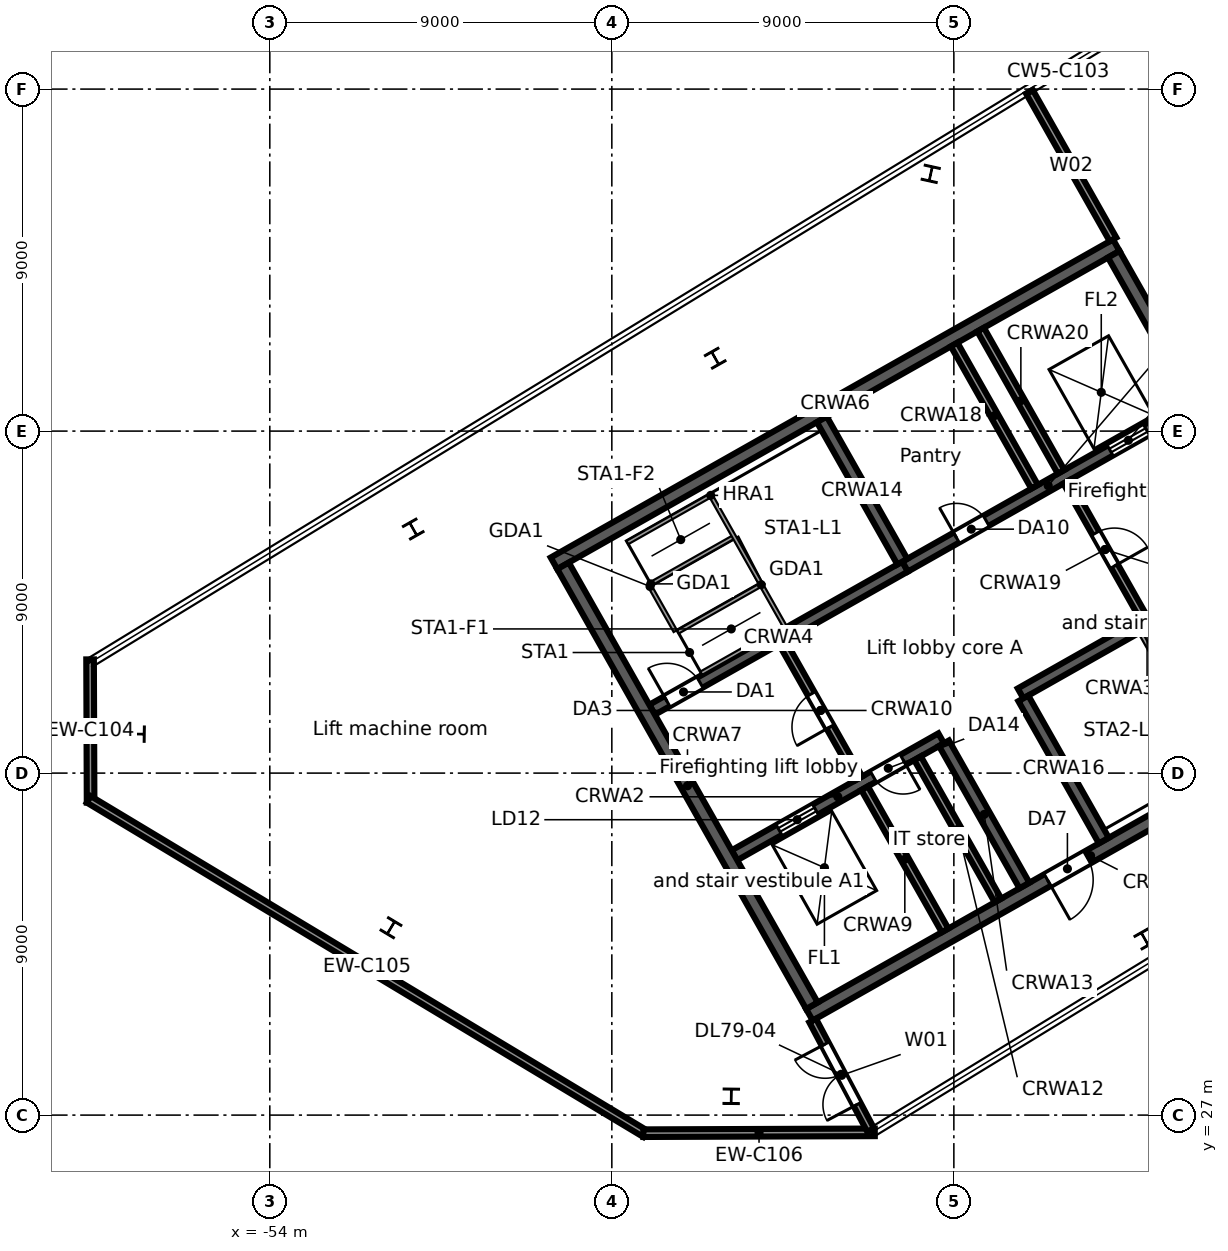
"""IFC4 building model, lengths in metres.
Left out: names, types, materials, properties, quantities, classifications, styles, units other than length and angle.
Written with IfcOpenShell. Run it as: python <this file> out.ifc"""

import sys

from ifc_helpers import new_model, si_unit, direction, frame, frame_2d, origin, origin_2d, place, context, subcontext, project, spatial, rectangle, i_section, extrude, element, fill, save


model = new_model("IFC4")
c1 = context("Model", 3, precision=1e-05, world=origin(), true_north=direction((0.0, 1.0)))
c2 = subcontext(c1, "Body", "Model", "MODEL_VIEW")
j1 = project(units=[si_unit("LENGTHUNIT", "METRE"), si_unit("PLANEANGLEUNIT", "RADIAN")], contexts=[c1])
p1 = place(None, origin())
s1 = spatial("IfcSite", under=j1, at=p1, CompositionType="ELEMENT")
p2 = place(p1, origin())
s2 = spatial("IfcBuilding", under=s1, at=p2, CompositionType="ELEMENT")
p3 = place(p2, frame((0.0, 0.0, 350.5)))
s3 = spatial("IfcBuildingStorey", under=s2, at=p3, CompositionType="ELEMENT", Elevation=350.5)
p4 = place(p3, frame((-42.28, 46.919, 0.0), z_axis=(0.0, 0.0, 1.0), x_axis=(-0.87035569594, -0.492423560103, 0.0)))
e1 = element("IfcColumn", 1, at=p4, inside=s3, PredefinedType="COLUMN", context=c2, shape_type="SweptSolid", body=[
    extrude(i_section(OverallWidth=0.4, OverallDepth=0.4, WebThickness=0.013, FlangeThickness=0.021, FilletRadius=0.022, at=origin_2d()), origin(), (0.0, 0.0, 1.0), 3.3),
])
for number, where, z_axis, x_axis in (
    (2, (-50.226, 42.423, 0.0), (0.0, 0.0, 1.0), (-0.87, -0.492, 0.0)),
    (3, (-57.493, 37.027, 0.0), (0.0, 0.0, 1.0), (-0.013, -1.0, 0.0)),
    (4, (-50.812, 31.931, 0.0), (0.0, 0.0, 1.0), (0.857, -0.515, 0.0)),
    (5, (-41.858, 27.495, 0.0), (0.0, 0.0, 1.0), (1.0, -0.013, 0.0)),
):
    element("IfcColumn", number, at=place(p3, frame(where, z_axis=z_axis, x_axis=x_axis)), inside=s3, PredefinedType="COLUMN", context=c2, shape_type="SweptSolid", body=[
        extrude(i_section(OverallWidth=0.4, OverallDepth=0.4, WebThickness=0.013, FlangeThickness=0.021, FilletRadius=0.022, at=origin_2d()), origin(), (0.0, 0.0, 1.0), 3.6),
    ])
for number, where, z_axis, x_axis in (
    (6, (-30.976, 31.635, 0.0), (0.0, 0.0, 1.0), (0.87, 0.492, 0.0)),
    (7, (-36.609, 51.77, 0.0), (0.0, 0.0, 1.0), (-0.977, 0.215, 0.0)),
):
    element("IfcColumn", number, at=place(p3, frame(where, z_axis=z_axis, x_axis=x_axis)), inside=s3, PredefinedType="COLUMN", context=c2, shape_type="SweptSolid", body=[
        extrude(i_section(OverallWidth=0.4, OverallDepth=0.4, WebThickness=0.013, FlangeThickness=0.021, FilletRadius=0.022, at=origin_2d()), origin(), (0.0, 0.0, 1.0), 3.3),
    ])
p5 = place(p3, frame((-58.716, 35.224, 0.0), z_axis=(0.0, 0.0, 1.0), x_axis=(-0.003563076631, 0.999993652222, 0.0)))
e8 = element("IfcWall", 8, at=p5, inside=s3, PredefinedType="STANDARD", context=c2, shape_type="SweptSolid", body=[
    extrude(rectangle(XDim=3.769, YDim=0.2, at=frame_2d((1.884, 0.0))), origin(), (0.0, 0.0, 1.0), 3.3),
])
p6 = place(p3, frame((-44.12, 26.51, 0.0), z_axis=(0.0, 0.0, 1.0), x_axis=(-0.85716996621, 0.515033638734, 0.0)))
e9 = element("IfcWall", 9, at=p6, inside=s3, PredefinedType="STANDARD", context=c2, shape_type="SweptSolid", body=[
    extrude(rectangle(XDim=17.084, YDim=0.2, at=frame_2d((8.542, 0.0))), origin(), (0.0, 0.0, 1.0), 3.3),
])
p7 = place(p3, frame((-38.081, 26.546, 0.0), z_axis=(0.0, 0.0, 1.0), x_axis=(-0.999993637837, -0.003567111574, 0.0)))
e10 = element("IfcWall", 10, at=p7, inside=s3, PredefinedType="STANDARD", context=c2, shape_type="SweptSolid", body=[
    extrude(rectangle(XDim=6.091, YDim=0.2, at=frame_2d((3.046, 0.0))), origin(), (0.0, 0.0, 1.0), 3.3),
])
p8 = place(p3, frame((-39.801, 29.64, 0.0), z_axis=(0.0, 0.0, 1.0), x_axis=(0.870359753402, 0.492416388494, 0.0)))
e11 = element("IfcWall", 11, at=p8, inside=s3, PredefinedType="SOLIDWALL", context=c2, shape_type="SweptSolid", body=[
    extrude(rectangle(XDim=17.0, YDim=0.35, at=frame_2d((8.5, 0.0))), origin(), (0.0, 0.0, 1.0), 3.3),
])
p9 = place(p8, frame((7.2, 0.0, 0.0)))
e12 = element("IfcOpeningElement", 12, at=p9, cuts=e11, PredefinedType="OPENING", context=c2, shape_type="SweptSolid", body=[
    extrude(rectangle(XDim=1.2, YDim=2.1, at=frame_2d((0.6, 1.05))), frame((0.0, 0.185, 0.0), z_axis=(0.0, -1.0, 0.0), x_axis=(1.0, 0.0, 0.0)), (0.0, 0.0, 1.0), 0.37),
])
p10 = place(p3, frame((-41.774, 33.838, 0.0), z_axis=(0.0, 0.0, 1.0), x_axis=(0.870355415866, 0.492424055132, 0.0)))
e13 = element("IfcWall", 13, at=p10, inside=s3, PredefinedType="SOLIDWALL", context=c2, shape_type="SweptSolid", body=[
    extrude(rectangle(XDim=6.25, YDim=0.3, at=frame_2d((3.125, 0.0))), origin(), (0.0, 0.0, 1.0), 3.3),
])
p11 = place(p10, frame((1.35, 0.0, 0.0)))
e14 = element("IfcOpeningElement", 14, at=p11, cuts=e13, PredefinedType="OPENING", context=c2, shape_type="SweptSolid", body=[
    extrude(rectangle(XDim=1.1, YDim=2.1, at=frame_2d((0.55, 1.05))), frame((0.0, 0.16, 0.0), z_axis=(0.0, -1.0, 0.0), x_axis=(1.0, 0.0, 0.0)), (0.0, 0.0, 1.0), 0.32),
])
p12 = place(p10, frame((4.2, 0.0, 0.0)))
e15 = element("IfcOpeningElement", 15, at=p12, cuts=e13, PredefinedType="OPENING", context=c2, shape_type="SweptSolid", body=[
    extrude(rectangle(XDim=0.9, YDim=2.1, at=frame_2d((0.45, 1.05))), frame((0.0, 0.16, 0.0), z_axis=(0.0, -1.0, 0.0), x_axis=(1.0, 0.0, 0.0)), (0.0, 0.0, 1.0), 0.32),
])
p13 = place(p3, frame((-34.245, 38.097, 0.0), z_axis=(0.0, 0.0, 1.0), x_axis=(0.870352347706, 0.49242947804, 0.0)))
e16 = element("IfcWall", 16, at=p13, inside=s3, PredefinedType="SOLIDWALL", context=c2, shape_type="SweptSolid", body=[
    extrude(rectangle(XDim=7.65, YDim=0.3, at=frame_2d((3.825, 0.0))), origin(), (0.0, 0.0, 1.0), 3.3),
])
p14 = place(p13, frame((6.2, 0.0, 0.0)))
e17 = element("IfcOpeningElement", 17, at=p14, cuts=e16, PredefinedType="OPENING", context=c2, shape_type="SweptSolid", body=[
    extrude(rectangle(XDim=1.0, YDim=2.1, at=frame_2d((0.5, 1.05))), frame((0.0, 0.16, 0.0), z_axis=(0.0, -1.0, 0.0), x_axis=(1.0, 0.0, 0.0)), (0.0, 0.0, 1.0), 0.32),
])
p15 = place(p3, frame((-43.94, 37.667, 0.0), z_axis=(0.0, 0.0, 1.0), x_axis=(0.870352347706, 0.49242947804, 0.0)))
e18 = element("IfcWall", 18, at=p15, inside=s3, PredefinedType="SOLIDWALL", context=c2, shape_type="SweptSolid", body=[
    extrude(rectangle(XDim=7.65, YDim=0.3, at=frame_2d((3.825, 0.0))), origin(), (0.0, 0.0, 1.0), 3.3),
])
p16 = place(p15, frame((0.45, 0.0, 0.0)))
e19 = element("IfcOpeningElement", 19, at=p16, cuts=e18, PredefinedType="OPENING", context=c2, shape_type="SweptSolid", body=[
    extrude(rectangle(XDim=1.0, YDim=2.1, at=frame_2d((0.5, 1.05))), frame((0.0, 0.16, 0.0), z_axis=(0.0, -1.0, 0.0), x_axis=(1.0, 0.0, 0.0)), (0.0, 0.0, 1.0), 0.32),
])
p17 = place(p3, frame((-37.282, 41.435, 0.0), z_axis=(0.0, 0.0, 1.0), x_axis=(0.870364588774, 0.492407841741, 0.0)))
e20 = element("IfcWall", 20, at=p17, inside=s3, PredefinedType="SOLIDWALL", context=c2, shape_type="SweptSolid", body=[
    extrude(rectangle(XDim=8.65, YDim=0.3, at=frame_2d((4.325, 0.0))), origin(), (0.0, 0.0, 1.0), 3.3),
])
p18 = place(p17, frame((6.2, 0.0, 0.0)))
e21 = element("IfcOpeningElement", 21, at=p18, cuts=e20, PredefinedType="OPENING", context=c2, shape_type="SweptSolid", body=[
    extrude(rectangle(XDim=1.1, YDim=2.1, at=frame_2d((0.55, 1.05))), frame((0.0, 0.16, 0.0), z_axis=(0.0, -1.0, 0.0), x_axis=(1.0, 0.0, 0.0)), (0.0, 0.0, 1.0), 0.32),
])
p19 = place(p17, frame((1.55, 0.0, 0.0)))
e22 = element("IfcOpeningElement", 22, at=p19, cuts=e20, PredefinedType="OPENING", context=c2, shape_type="SweptSolid", body=[
    extrude(rectangle(XDim=0.9, YDim=2.1, at=frame_2d((0.45, 1.05))), frame((0.0, 0.16, 0.0), z_axis=(0.0, -1.0, 0.0), x_axis=(1.0, 0.0, 0.0)), (0.0, 0.0, 1.0), 0.32),
])
p20 = place(p3, frame((-46.522, 41.521, 0.0), z_axis=(0.0, 0.0, 1.0), x_axis=(0.870359753402, 0.492416388494, 0.0)))
e23 = element("IfcWall", 23, at=p20, inside=s3, PredefinedType="SOLIDWALL", context=c2, shape_type="SweptSolid", body=[
    extrude(rectangle(XDim=17.0, YDim=0.35, at=frame_2d((8.5, 0.0))), origin(), (0.0, 0.0, 1.0), 3.3),
])
p21 = place(p3, frame((-46.284, 41.454, 0.0), z_axis=(0.0, 0.0, 1.0), x_axis=(0.492429810477, -0.870352159619, 0.0)))
e24 = element("IfcWall", 24, at=p21, inside=s3, PredefinedType="SOLIDWALL", context=c2, shape_type="SweptSolid", body=[
    extrude(rectangle(XDim=13.3, YDim=0.35, at=frame_2d((6.65, 0.0))), origin(), (0.0, 0.0, 1.0), 3.3),
])
p22 = place(p3, frame((-38.349, 35.603, 0.0), z_axis=(0.0, 0.0, 1.0), x_axis=(0.492410799949, -0.870362915164, 0.0)))
e25 = element("IfcWall", 25, at=p22, inside=s3, PredefinedType="SOLIDWALL", context=c2, shape_type="SweptSolid", body=[
    extrude(rectangle(XDim=4.3, YDim=0.2, at=frame_2d((2.15, 0.0))), origin(), (0.0, 0.0, 1.0), 3.3),
])
p23 = place(p3, frame((-40.516, 39.433, 0.0), z_axis=(0.0, 0.0, 1.0), x_axis=(0.492453559952, -0.87033872216, 0.0)))
e26 = element("IfcWall", 26, at=p23, inside=s3, PredefinedType="PARTITIONING", context=c2, shape_type="SweptSolid", body=[
    extrude(rectangle(XDim=4.1, YDim=0.2, at=frame_2d((2.05, 0.0))), origin(), (0.0, 0.0, 1.0), 3.3),
])
p24 = place(p23, frame((1.55, 0.0, 0.0)))
e27 = element("IfcOpeningElement", 27, at=p24, cuts=e26, PredefinedType="OPENING", context=c2, shape_type="SweptSolid", body=[
    extrude(rectangle(XDim=1.0, YDim=2.1, at=frame_2d((0.5, 1.05))), frame((0.0, 0.11, 0.0), z_axis=(0.0, -1.0, 0.0), x_axis=(1.0, 0.0, 0.0)), (0.0, 0.0, 1.0), 0.22),
])
p25 = place(p3, frame((-36.956, 36.391, 0.0), z_axis=(0.0, 0.0, 1.0), x_axis=(0.492410799949, -0.870362915164, 0.0)))
e28 = element("IfcWall", 28, at=p25, inside=s3, PredefinedType="SOLIDWALL", context=c2, shape_type="SweptSolid", body=[
    extrude(rectangle(XDim=4.3, YDim=0.2, at=frame_2d((2.15, 0.0))), origin(), (0.0, 0.0, 1.0), 3.3),
])
p26 = place(p3, frame((-36.26, 36.785, 0.0), z_axis=(0.0, 0.0, 1.0), x_axis=(0.492435133428, -0.870349147967, 0.0)))
e29 = element("IfcWall", 29, at=p26, inside=s3, PredefinedType="SOLIDWALL", context=c2, shape_type="SweptSolid", body=[
    extrude(rectangle(XDim=4.3, YDim=0.3, at=frame_2d((2.15, 0.0))), origin(), (0.0, 0.0, 1.0), 3.3),
])
p27 = place(p3, frame((-39.473, 45.308, 0.0), z_axis=(0.0, 0.0, 1.0), x_axis=(0.492410799949, -0.870362915164, 0.0)))
e30 = element("IfcWall", 30, at=p27, inside=s3, PredefinedType="SOLIDWALL", context=c2, shape_type="SweptSolid", body=[
    extrude(rectangle(XDim=4.3, YDim=0.3, at=frame_2d((2.15, 0.0))), origin(), (0.0, 0.0, 1.0), 3.3),
])
p28 = place(p3, frame((-34.171, 37.967, 0.0), z_axis=(0.0, 0.0, 1.0), x_axis=(0.492435133428, -0.870349147967, 0.0)))
e31 = element("IfcWall", 31, at=p28, inside=s3, PredefinedType="SOLIDWALL", context=c2, shape_type="SweptSolid", body=[
    extrude(rectangle(XDim=4.3, YDim=0.3, at=frame_2d((2.15, 0.0))), origin(), (0.0, 0.0, 1.0), 3.3),
])
p29 = place(p3, frame((-35.992, 47.277, 0.0), z_axis=(0.0, 0.0, 1.0), x_axis=(0.492410799949, -0.870362915164, 0.0)))
e32 = element("IfcWall", 32, at=p29, inside=s3, PredefinedType="SOLIDWALL", context=c2, shape_type="SweptSolid", body=[
    extrude(rectangle(XDim=4.3, YDim=0.2, at=frame_2d((2.15, 0.0))), origin(), (0.0, 0.0, 1.0), 3.3),
])
p30 = place(p3, frame((-33.031, 43.667, 0.0), z_axis=(0.0, 0.0, 1.0), x_axis=(0.492408451753, -0.87036424366, 0.0)))
e33 = element("IfcWall", 33, at=p30, inside=s3, PredefinedType="PARTITIONING", context=c2, shape_type="SweptSolid", body=[
    extrude(rectangle(XDim=4.1, YDim=0.2, at=frame_2d((2.05, 0.0))), origin(), (0.0, 0.0, 1.0), 3.3),
])
p31 = place(p30, frame((1.55, 0.0, 0.0)))
e34 = element("IfcOpeningElement", 34, at=p31, cuts=e33, PredefinedType="OPENING", context=c2, shape_type="SweptSolid", body=[
    extrude(rectangle(XDim=1.0, YDim=2.1, at=frame_2d((0.5, 1.05))), frame((0.0, 0.11, 0.0), z_axis=(0.0, -1.0, 0.0), x_axis=(1.0, 0.0, 0.0)), (0.0, 0.0, 1.0), 0.22),
])
p32 = place(p3, frame((-35.296, 47.671, 0.0), z_axis=(0.0, 0.0, 1.0), x_axis=(0.492435133428, -0.870349147967, 0.0)))
e35 = element("IfcWall", 35, at=p32, inside=s3, PredefinedType="SOLIDWALL", context=c2, shape_type="SweptSolid", body=[
    extrude(rectangle(XDim=4.3, YDim=0.2, at=frame_2d((2.15, 0.0))), origin(), (0.0, 0.0, 1.0), 3.3),
])
p33 = place(p3, frame((-31.792, 49.653, 0.0), z_axis=(0.0, 0.0, 1.0), x_axis=(0.492421943245, -0.870356610712, 0.0)))
e36 = element("IfcWall", 36, at=p33, inside=s3, PredefinedType="SOLIDWALL", context=c2, shape_type="SweptSolid", body=[
    extrude(rectangle(XDim=13.3, YDim=0.35, at=frame_2d((6.65, 0.0))), origin(), (0.0, 0.0, 1.0), 3.3),
])
p34 = place(p3, frame((-39.715, 29.488, 0.0), z_axis=(0.0, 0.0, 1.0), x_axis=(0.467963390189, -0.883747851733, 0.0)))
e37 = element("IfcWall", 37, at=p34, inside=s3, PredefinedType="PARTITIONING", context=c2, shape_type="SweptSolid", body=[
    extrude(rectangle(XDim=3.261, YDim=0.2, at=frame_2d((1.631, 0.0))), origin(), (0.0, 0.0, 1.0), 2.68),
])
p35 = place(p34, frame((0.7, 0.0, 0.0)))
e38 = element("IfcOpeningElement", 38, at=p35, cuts=e37, PredefinedType="OPENING", context=c2, shape_type="SweptSolid", body=[
    extrude(rectangle(XDim=1.8, YDim=2.1, at=frame_2d((0.9, 1.05))), frame((0.0, 0.11, 0.0), z_axis=(0.0, -1.0, 0.0), x_axis=(1.0, 0.0, 0.0)), (0.0, 0.0, 1.0), 0.22),
])
p36 = place(p3, frame((-34.012, 53.93, 0.0), z_axis=(0.0, 0.0, 1.0), x_axis=(0.49265524993, -0.870224571428, 0.0)))
e39 = element("IfcWall", 39, at=p36, inside=s3, PredefinedType="PARTITIONING", context=c2, shape_type="SweptSolid", body=[
    extrude(rectangle(XDim=4.466, YDim=0.2, at=frame_2d((2.233, 0.0))), origin(), (0.0, 0.0, 1.0), 2.18),
])
p37 = place(p18, origin())
e40 = element("IfcDoor", 40, at=p37, inside=s3, OperationType="DOUBLE_DOOR_SLIDING", PredefinedType="DOOR", context=c2, shape_type="SweptSolid", body=[
    extrude(rectangle(XDim=1.1, YDim=2.1, at=frame_2d((0.55, 1.05))), frame((0.0, 0.025, 0.0), z_axis=(0.0, -1.0, 0.0), x_axis=(1.0, 0.0, 0.0)), (0.0, 0.0, 1.0), 0.05),
])
fill(e21, e40)
p38 = place(p11, origin())
e41 = element("IfcDoor", 41, at=p38, inside=s3, OperationType="DOUBLE_DOOR_SLIDING", PredefinedType="DOOR", context=c2, shape_type="SweptSolid", body=[
    extrude(rectangle(XDim=1.1, YDim=2.1, at=frame_2d((0.55, 1.05))), frame((0.0, 0.025, 0.0), z_axis=(0.0, -1.0, 0.0), x_axis=(1.0, 0.0, 0.0)), (0.0, 0.0, 1.0), 0.05),
])
fill(e14, e41)
p39 = place(p16, origin())
e42 = element("IfcDoor", 42, at=p39, inside=s3, OperationType="SINGLE_SWING_LEFT", PredefinedType="DOOR", context=c2, shape_type="SweptSolid", body=[
    extrude(rectangle(XDim=1.0, YDim=2.1, at=frame_2d((0.5, 1.05))), frame((0.0, 0.025, 0.0), z_axis=(0.0, -1.0, 0.0), x_axis=(1.0, 0.0, 0.0)), (0.0, 0.0, 1.0), 0.05),
])
fill(e19, e42)
p40 = place(p24, frame((1.0, 0.0, 0.0), z_axis=(0.0, 0.0, 1.0), x_axis=(-1.0, 0.0, 0.0)))
e43 = element("IfcDoor", 43, at=p40, inside=s3, OperationType="SINGLE_SWING_LEFT", PredefinedType="DOOR", context=c2, shape_type="SweptSolid", body=[
    extrude(rectangle(XDim=1.0, YDim=2.1, at=frame_2d((0.5, 1.05))), frame((0.0, 0.025, 0.0), z_axis=(0.0, -1.0, 0.0), x_axis=(1.0, 0.0, 0.0)), (0.0, 0.0, 1.0), 0.05),
])
fill(e27, e43)
p41 = place(p31, origin())
e44 = element("IfcDoor", 44, at=p41, inside=s3, OperationType="SINGLE_SWING_RIGHT", PredefinedType="DOOR", context=c2, shape_type="SweptSolid", body=[
    extrude(rectangle(XDim=1.0, YDim=2.1, at=frame_2d((0.5, 1.05))), frame((0.0, 0.025, 0.0), z_axis=(0.0, -1.0, 0.0), x_axis=(1.0, 0.0, 0.0)), (0.0, 0.0, 1.0), 0.05),
])
fill(e34, e44)
p42 = place(p9, frame((1.2, 0.0, 0.0), z_axis=(0.0, 0.0, 1.0), x_axis=(-1.0, 0.0, 0.0)))
e45 = element("IfcDoor", 45, at=p42, inside=s3, OperationType="SINGLE_SWING_RIGHT", PredefinedType="DOOR", context=c2, shape_type="SweptSolid", body=[
    extrude(rectangle(XDim=1.2, YDim=2.1, at=frame_2d((0.6, 1.05))), frame((0.0, 0.025, 0.0), z_axis=(0.0, -1.0, 0.0), x_axis=(1.0, 0.0, 0.0)), (0.0, 0.0, 1.0), 0.05),
])
fill(e12, e45)
p43 = place(p19, origin())
e46 = element("IfcDoor", 46, at=p43, inside=s3, OperationType="SINGLE_SWING_LEFT", PredefinedType="DOOR", context=c2, shape_type="SweptSolid", body=[
    extrude(rectangle(XDim=0.9, YDim=2.1, at=frame_2d((0.45, 1.05))), frame((0.0, 0.025, 0.0), z_axis=(0.0, -1.0, 0.0), x_axis=(1.0, 0.0, 0.0)), (0.0, 0.0, 1.0), 0.05),
])
fill(e22, e46)
p44 = place(p12, frame((0.9, 0.0, 0.0), z_axis=(0.0, 0.0, 1.0), x_axis=(-1.0, 0.0, 0.0)))
e47 = element("IfcDoor", 47, at=p44, inside=s3, OperationType="SINGLE_SWING_LEFT", PredefinedType="DOOR", context=c2, shape_type="SweptSolid", body=[
    extrude(rectangle(XDim=0.9, YDim=2.1, at=frame_2d((0.45, 1.05))), frame((0.0, 0.025, 0.0), z_axis=(0.0, -1.0, 0.0), x_axis=(1.0, 0.0, 0.0)), (0.0, 0.0, 1.0), 0.05),
])
fill(e15, e47)
p45 = place(p35, frame((1.8, 0.0, 0.0), z_axis=(0.0, 0.0, 1.0), x_axis=(-1.0, 0.0, 0.0)))
e48 = element("IfcDoor", 48, at=p45, inside=s3, OperationType="DOUBLE_DOOR_SINGLE_SWING", PredefinedType="DOOR", context=c2, shape_type="SweptSolid", body=[
    extrude(rectangle(XDim=1.8, YDim=2.1, at=frame_2d((0.9, 1.05))), frame((0.0, 0.025, 0.0), z_axis=(0.0, -1.0, 0.0), x_axis=(1.0, 0.0, 0.0)), (0.0, 0.0, 1.0), 0.05),
])
fill(e38, e48)
save(model, sys.argv[1])
